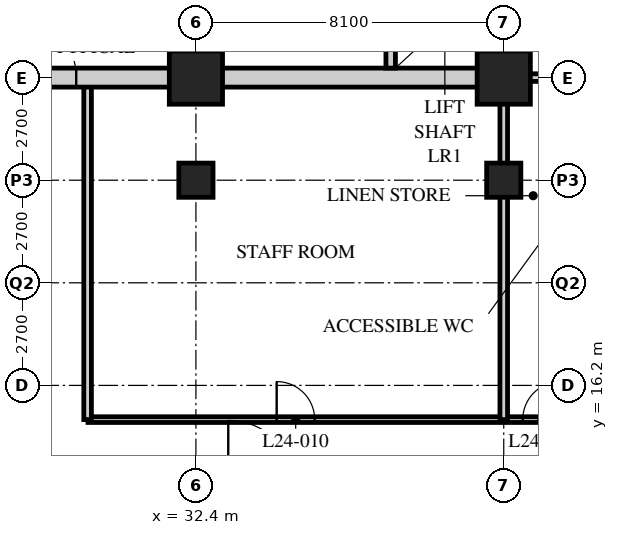
"""IFC4 building model, lengths in metres.
Left out: names, types, materials, properties, quantities, classifications, styles, units other than length and angle.
Written with IfcOpenShell. Run it as: python <this file> out.ifc"""

import sys

from ifc_helpers import new_model, si_unit, direction, frame, frame_2d, origin, origin_2d, place, context, subcontext, project, spatial, rectangle, hollow_rectangle, extrude, element, fill, save


model = new_model("IFC4")
c1 = context("Model", 3, precision=1e-05, world=origin(), true_north=direction((0.0, 1.0)))
c2 = subcontext(c1, "Body", "Model", "MODEL_VIEW")
j1 = project(units=[si_unit("LENGTHUNIT", "METRE"), si_unit("PLANEANGLEUNIT", "RADIAN")], contexts=[c1])
p1 = place(None, origin())
s1 = spatial("IfcSite", under=j1, at=p1, CompositionType="ELEMENT")
p2 = place(p1, origin())
s2 = spatial("IfcBuilding", under=s1, at=p2, CompositionType="ELEMENT")
p3 = place(p2, frame((0.0, 0.0, 98.0)))
s3 = spatial("IfcBuildingStorey", under=s2, at=p3, CompositionType="ELEMENT", Elevation=98.0)
p4 = place(p3, frame((32.4, 21.6, 0.0), z_axis=(0.0, 0.0, 1.0), x_axis=(1.0, 0.0, 0.0)))
e1 = element("IfcColumn", 1, at=p4, inside=s3, PredefinedType="COLUMN", context=c2, shape_type="SweptSolid", body=[
    extrude(hollow_rectangle(XDim=0.9, YDim=0.9, WallThickness=0.1, at=origin_2d()), origin(), (0.0, 0.0, 1.0), 5.4),
])
p5 = place(p3, frame((32.4, 24.3, 0.0), z_axis=(0.0, 0.0, 1.0), x_axis=(1.0, 0.0, 0.0)))
e2 = element("IfcColumn", 2, at=p5, inside=s3, PredefinedType="COLUMN", context=c2, shape_type="SweptSolid", body=[
    extrude(hollow_rectangle(XDim=1.4, YDim=1.4, WallThickness=0.12, at=origin_2d()), origin(), (0.0, 0.0, 1.0), 5.4),
])
p6 = place(p3, frame((40.5, 21.6, 0.0), z_axis=(0.0, 0.0, 1.0), x_axis=(1.0, 0.0, 0.0)))
e3 = element("IfcColumn", 3, at=p6, inside=s3, PredefinedType="COLUMN", context=c2, shape_type="SweptSolid", body=[
    extrude(hollow_rectangle(XDim=0.9, YDim=0.9, WallThickness=0.1, at=origin_2d()), origin(), (0.0, 0.0, 1.0), 5.4),
])
p7 = place(p3, frame((40.5, 24.3, 0.0), z_axis=(0.0, 0.0, 1.0), x_axis=(1.0, 0.0, 0.0)))
e4 = element("IfcColumn", 4, at=p7, inside=s3, PredefinedType="COLUMN", context=c2, shape_type="SweptSolid", body=[
    extrude(hollow_rectangle(XDim=1.4, YDim=1.4, WallThickness=0.12, at=origin_2d()), origin(), (0.0, 0.0, 1.0), 5.4),
])
p8 = place(p3, frame((29.56, 15.3, 0.0), z_axis=(0.0, 0.0, 1.0), x_axis=(1.0, 0.0, 0.0)))
e5 = element("IfcWall", 5, at=p8, inside=s3, PredefinedType="PARTITIONING", context=c2, shape_type="SweptSolid", body=[
    extrude(rectangle(XDim=17.24, YDim=0.15, at=frame_2d((8.62, 0.0))), origin(), (0.0, 0.0, 1.0), 5.19),
])
p9 = place(p8, frame((4.965, 0.0, 0.0)))
e6 = element("IfcOpeningElement", 6, at=p9, cuts=e5, PredefinedType="OPENING", context=c2, shape_type="SweptSolid", body=[
    extrude(rectangle(XDim=1.0, YDim=2.1, at=frame_2d((0.5, 1.05))), frame((0.0, 0.085, 0.0), z_axis=(0.0, -1.0, 0.0), x_axis=(1.0, 0.0, 0.0)), (0.0, 0.0, 1.0), 0.17),
])
p10 = place(p8, frame((11.44, 0.0, 0.0)))
e7 = element("IfcOpeningElement", 7, at=p10, cuts=e5, PredefinedType="OPENING", context=c2, shape_type="SweptSolid", body=[
    extrude(rectangle(XDim=1.0, YDim=2.1, at=frame_2d((0.5, 1.05))), frame((0.0, 0.085, 0.0), z_axis=(0.0, -1.0, 0.0), x_axis=(1.0, 0.0, 0.0)), (0.0, 0.0, 1.0), 0.17),
])
p11 = place(p8, frame((14.59, 0.0, 0.0)))
e8 = element("IfcOpeningElement", 8, at=p11, cuts=e5, PredefinedType="OPENING", context=c2, shape_type="SweptSolid", body=[
    extrude(rectangle(XDim=1.0, YDim=2.1, at=frame_2d((0.5, 1.05))), frame((0.0, 0.085, 0.0), z_axis=(0.0, -1.0, 0.0), x_axis=(1.0, 0.0, 0.0)), (0.0, 0.0, 1.0), 0.17),
])
p12 = place(p3, frame((40.5, 15.3, 0.0), z_axis=(0.0, 0.0, 1.0), x_axis=(0.0, 1.0, 0.0)))
e9 = element("IfcWall", 9, at=p12, inside=s3, PredefinedType="SOLIDWALL", context=c2, shape_type="SweptSolid", body=[
    extrude(rectangle(XDim=9.0, YDim=0.2, at=frame_2d((4.5, 0.0))), origin(), (0.0, 0.0, 1.0), 4.49),
])
p13 = place(p3, frame((29.55, 15.3, 0.0), z_axis=(0.0, 0.0, 1.0), x_axis=(0.0, 1.0, 0.0)))
e10 = element("IfcWall", 10, at=p13, inside=s3, PredefinedType="SOLIDWALL", context=c2, shape_type="SweptSolid", body=[
    extrude(rectangle(XDim=9.0, YDim=0.2, at=frame_2d((4.5, 0.0))), origin(), (0.0, 0.0, 1.0), 5.19),
])
p14 = place(p3, frame((40.5, 24.3, 0.0), z_axis=(0.0, 0.0, 1.0), x_axis=(1.0, 0.0, 0.0)))
e11 = element("IfcWall", 11, at=p14, inside=s3, PredefinedType="SOLIDWALL", context=c2, shape_type="SweptSolid", body=[
    extrude(rectangle(XDim=6.3, YDim=0.2, at=frame_2d((3.15, 0.0))), origin(), (0.0, 0.0, 1.0), 5.19),
])
p15 = place(p3, frame((15.95, 24.3, 0.0), z_axis=(0.0, 0.0, 1.0), x_axis=(1.0, 0.0, 0.0)))
e12 = element("IfcWall", 12, at=p15, inside=s3, PredefinedType="SOLIDWALL", context=c2, shape_type="SweptSolid", body=[
    extrude(rectangle(XDim=24.8, YDim=0.5, at=frame_2d((12.4, 0.0))), origin(), (0.0, 0.0, 1.0), 4.49),
])
p16 = place(p15, frame((11.5, 0.0, 0.0)))
e13 = element("IfcOpeningElement", 13, at=p16, cuts=e12, PredefinedType="OPENING", context=c2, shape_type="SweptSolid", body=[
    extrude(rectangle(XDim=1.8, YDim=2.4, at=frame_2d((0.9, 1.2))), frame((0.0, 0.26, 0.0), z_axis=(0.0, -1.0, 0.0), x_axis=(1.0, 0.0, 0.0)), (0.0, 0.0, 1.0), 0.52),
])
p17 = place(p3, frame((40.5, 24.55, 0.0), z_axis=(0.0, 0.0, 1.0), x_axis=(0.0, 1.0, 0.0)))
e14 = element("IfcWall", 14, at=p17, inside=s3, PredefinedType="SOLIDWALL", context=c2, shape_type="SweptSolid", body=[
    extrude(rectangle(XDim=15.7, YDim=0.5, at=frame_2d((7.85, 0.0))), origin(), (0.0, 0.0, 1.0), 4.49),
])
p18 = place(p3, frame((37.525, 24.55, 0.0), z_axis=(0.0, 0.0, 1.0), x_axis=(0.0, 1.0, 0.0)))
e15 = element("IfcWall", 15, at=p18, inside=s3, PredefinedType="SOLIDWALL", context=c2, shape_type="SweptSolid", body=[
    extrude(rectangle(XDim=7.75, YDim=0.25, at=frame_2d((3.875, 0.0))), origin(), (0.0, 0.0, 1.0), 5.19),
])
p19 = place(p3, frame((32.4, 24.55, 0.0), z_axis=(0.0, 0.0, 1.0), x_axis=(0.0, 1.0, 0.0)))
e16 = element("IfcWall", 16, at=p19, inside=s3, PredefinedType="PARTITIONING", context=c2, shape_type="SweptSolid", body=[
    extrude(rectangle(XDim=7.75, YDim=0.2, at=frame_2d((3.875, 0.0))), origin(), (0.0, 0.0, 1.0), 4.578),
])
p20 = place(p19, frame((1.55, 0.0, 0.0)))
e17 = element("IfcOpeningElement", 17, at=p20, cuts=e16, PredefinedType="OPENING", context=c2, shape_type="SweptSolid", body=[
    extrude(rectangle(XDim=0.9, YDim=2.1, at=frame_2d((0.45, 1.05))), frame((0.0, 0.11, 0.0), z_axis=(0.0, -1.0, 0.0), x_axis=(1.0, 0.0, 0.0)), (0.0, 0.0, 1.0), 0.22),
])
p21 = place(p19, frame((5.45, 0.0, 0.0)))
e18 = element("IfcOpeningElement", 18, at=p21, cuts=e16, PredefinedType="OPENING", context=c2, shape_type="SweptSolid", body=[
    extrude(rectangle(XDim=1.0, YDim=2.1, at=frame_2d((0.5, 1.05))), frame((0.0, 0.11, 0.0), z_axis=(0.0, -1.0, 0.0), x_axis=(1.0, 0.0, 0.0)), (0.0, 0.0, 1.0), 0.22),
])
p22 = place(p9, origin())
e19 = element("IfcDoor", 19, at=p22, inside=s3, OperationType="SINGLE_SWING_LEFT", PredefinedType="DOOR", context=c2, shape_type="SweptSolid", body=[
    extrude(rectangle(XDim=1.0, YDim=2.1, at=frame_2d((0.5, 1.05))), frame((0.0, 0.025, 0.0), z_axis=(0.0, -1.0, 0.0), x_axis=(1.0, 0.0, 0.0)), (0.0, 0.0, 1.0), 0.05),
])
fill(e6, e19)
p23 = place(p10, origin())
e20 = element("IfcDoor", 20, at=p23, inside=s3, OperationType="SINGLE_SWING_RIGHT", PredefinedType="DOOR", context=c2, shape_type="SweptSolid", body=[
    extrude(rectangle(XDim=1.0, YDim=2.1, at=frame_2d((0.5, 1.05))), frame((0.0, 0.025, 0.0), z_axis=(0.0, -1.0, 0.0), x_axis=(1.0, 0.0, 0.0)), (0.0, 0.0, 1.0), 0.05),
])
fill(e7, e20)
p24 = place(p16, origin())
e21 = element("IfcDoor", 21, at=p24, inside=s3, OperationType="DOUBLE_DOOR_SINGLE_SWING", PredefinedType="DOOR", context=c2, shape_type="SweptSolid", body=[
    extrude(rectangle(XDim=1.8, YDim=2.4, at=frame_2d((0.9, 1.2))), frame((0.0, 0.025, 0.0), z_axis=(0.0, -1.0, 0.0), x_axis=(1.0, 0.0, 0.0)), (0.0, 0.0, 1.0), 0.05),
])
fill(e13, e21)
save(model, sys.argv[1])
